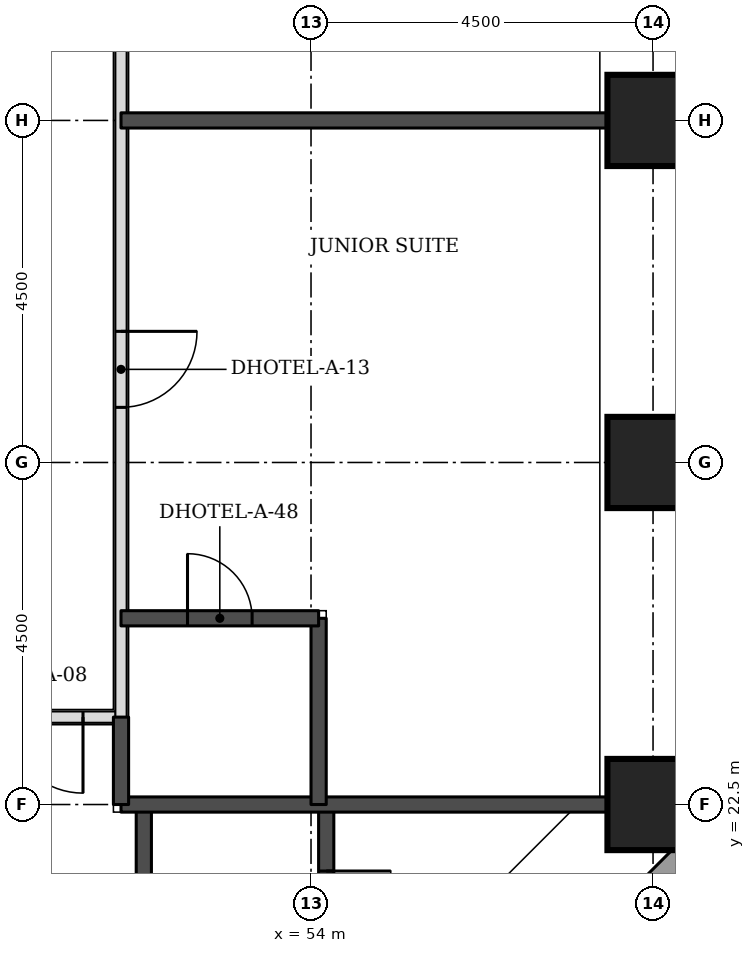
"""IFC4 building model, lengths in metres.
Left out: names, types, materials, properties, quantities, classifications, styles, units other than length and angle.
Written with IfcOpenShell. Run it as: python <this file> out.ifc"""

import sys

from ifc_helpers import new_model, si_unit, direction, frame, frame_2d, origin, origin_2d, place, context, subcontext, project, spatial, rectangle, extrude, element, fill, save


model = new_model("IFC4")
c1 = context("Model", 3, precision=1e-05, world=origin(), true_north=direction((0.0, 1.0)))
c2 = subcontext(c1, "Body", "Model", "MODEL_VIEW")
j1 = project(units=[si_unit("LENGTHUNIT", "METRE"), si_unit("PLANEANGLEUNIT", "RADIAN")], contexts=[c1])
p1 = place(None, origin())
s1 = spatial("IfcSite", under=j1, at=p1, CompositionType="ELEMENT")
p2 = place(p1, origin())
s2 = spatial("IfcBuilding", under=s1, at=p2, CompositionType="ELEMENT")
p3 = place(p2, frame((0.0, 0.0, 26.4)))
s3 = spatial("IfcBuildingStorey", under=s2, at=p3, CompositionType="ELEMENT", Elevation=26.4)
for number, where, z_axis, x_axis in (
    (1, (58.5, 22.5, 0.0), (0.0, 0.0, 1.0), (1.0, 0.0, 0.0)),
    (2, (58.5, 27.0, 0.0), (0.0, 0.0, 1.0), (1.0, 0.0, 0.0)),
    (3, (58.5, 31.5, 0.0), (0.0, 0.0, 1.0), (1.0, 0.0, 0.0)),
):
    element("IfcColumn", number, at=place(p3, frame(where, z_axis=z_axis, x_axis=x_axis)), inside=s3, PredefinedType="COLUMN", context=c2, shape_type="SweptSolid", body=[
        extrude(rectangle(XDim=1.2, YDim=1.2, at=origin_2d()), origin(), (0.0, 0.0, 1.0), 3.3),
    ])
p4 = place(p3, frame((54.27, 17.174, 0.0), z_axis=(0.0, 0.0, 1.0), x_axis=(0.707106781187, 0.707106781187, 0.0)))
e4 = element("IfcWall", 4, at=p4, inside=s3, PredefinedType="STANDARD", context=c2, shape_type="SweptSolid", body=[
    extrude(rectangle(XDim=7.151, YDim=0.35, at=frame_2d((3.576, 0.0))), origin(), (0.0, 0.0, 1.0), 3.055),
])
p5 = place(p4, frame((1.926, 0.0, 0.8)))
e5 = element("IfcOpeningElement", 5, at=p5, cuts=e4, PredefinedType="OPENING", context=c2, shape_type="SweptSolid", body=[
    extrude(rectangle(XDim=3.3, YDim=1.5, at=frame_2d((1.65, 0.75))), frame((0.0, 0.185, 0.0), z_axis=(0.0, -1.0, 0.0), x_axis=(1.0, 0.0, 0.0)), (0.0, 0.0, 1.0), 0.37),
])
p6 = place(p3, frame((19.15, 23.65, 0.0), z_axis=(0.0, 0.0, 1.0), x_axis=(1.0, 0.0, 0.0)))
e6 = element("IfcWall", 6, at=p6, inside=s3, PredefinedType="PARTITIONING", context=c2, shape_type="SweptSolid", body=[
    extrude(rectangle(XDim=32.35, YDim=0.15, at=frame_2d((16.175, 0.0))), origin(), (0.0, 0.0, 1.0), 3.08),
])
p7 = place(p6, frame((6.275, 0.0, 0.0)))
e7 = element("IfcOpeningElement", 7, at=p7, cuts=e6, PredefinedType="OPENING", context=c2, shape_type="SweptSolid", body=[
    extrude(rectangle(XDim=1.0, YDim=2.1, at=frame_2d((0.5, 1.05))), frame((0.0, 0.085, 0.0), z_axis=(0.0, -1.0, 0.0), x_axis=(1.0, 0.0, 0.0)), (0.0, 0.0, 1.0), 0.17),
])
p8 = place(p6, frame((8.675, 0.0, 0.0)))
e8 = element("IfcOpeningElement", 8, at=p8, cuts=e6, PredefinedType="OPENING", context=c2, shape_type="SweptSolid", body=[
    extrude(rectangle(XDim=1.0, YDim=2.1, at=frame_2d((0.5, 1.05))), frame((0.0, 0.085, 0.0), z_axis=(0.0, -1.0, 0.0), x_axis=(1.0, 0.0, 0.0)), (0.0, 0.0, 1.0), 0.17),
])
p9 = place(p6, frame((15.25, 0.0, 0.0)))
e9 = element("IfcOpeningElement", 9, at=p9, cuts=e6, PredefinedType="OPENING", context=c2, shape_type="SweptSolid", body=[
    extrude(rectangle(XDim=1.0, YDim=2.1, at=frame_2d((0.5, 1.05))), frame((0.0, 0.085, 0.0), z_axis=(0.0, -1.0, 0.0), x_axis=(1.0, 0.0, 0.0)), (0.0, 0.0, 1.0), 0.17),
])
p10 = place(p6, frame((17.675, 0.0, 0.0)))
e10 = element("IfcOpeningElement", 10, at=p10, cuts=e6, PredefinedType="OPENING", context=c2, shape_type="SweptSolid", body=[
    extrude(rectangle(XDim=1.0, YDim=2.1, at=frame_2d((0.5, 1.05))), frame((0.0, 0.085, 0.0), z_axis=(0.0, -1.0, 0.0), x_axis=(1.0, 0.0, 0.0)), (0.0, 0.0, 1.0), 0.17),
])
p11 = place(p6, frame((24.275, 0.0, 0.0)))
e11 = element("IfcOpeningElement", 11, at=p11, cuts=e6, PredefinedType="OPENING", context=c2, shape_type="SweptSolid", body=[
    extrude(rectangle(XDim=1.0, YDim=2.1, at=frame_2d((0.5, 1.05))), frame((0.0, 0.085, 0.0), z_axis=(0.0, -1.0, 0.0), x_axis=(1.0, 0.0, 0.0)), (0.0, 0.0, 1.0), 0.17),
])
p12 = place(p6, frame((26.675, 0.0, 0.0)))
e12 = element("IfcOpeningElement", 12, at=p12, cuts=e6, PredefinedType="OPENING", context=c2, shape_type="SweptSolid", body=[
    extrude(rectangle(XDim=1.0, YDim=2.1, at=frame_2d((0.5, 1.05))), frame((0.0, 0.085, 0.0), z_axis=(0.0, -1.0, 0.0), x_axis=(1.0, 0.0, 0.0)), (0.0, 0.0, 1.0), 0.17),
])
p13 = place(p6, frame((1.175, 0.0, 0.0)))
e13 = element("IfcOpeningElement", 13, at=p13, cuts=e6, PredefinedType="OPENING", context=c2, shape_type="SweptSolid", body=[
    extrude(rectangle(XDim=1.0, YDim=2.1, at=frame_2d((0.5, 1.05))), frame((0.0, 0.085, 0.0), z_axis=(0.0, -1.0, 0.0), x_axis=(1.0, 0.0, 0.0)), (0.0, 0.0, 1.0), 0.17),
])
p14 = place(p6, frame((30.85, 0.0, 0.0)))
e14 = element("IfcOpeningElement", 14, at=p14, cuts=e6, PredefinedType="OPENING", context=c2, shape_type="SweptSolid", body=[
    extrude(rectangle(XDim=1.0, YDim=2.1, at=frame_2d((0.5, 1.05))), frame((0.0, 0.085, 0.0), z_axis=(0.0, -1.0, 0.0), x_axis=(1.0, 0.0, 0.0)), (0.0, 0.0, 1.0), 0.17),
])
p15 = place(p3, frame((51.5, 23.65, 0.0), z_axis=(0.0, 0.0, 1.0), x_axis=(0.0, 1.0, 0.0)))
e15 = element("IfcWall", 15, at=p15, inside=s3, PredefinedType="PARTITIONING", context=c2, shape_type="SweptSolid", body=[
    extrude(rectangle(XDim=23.85, YDim=0.15, at=frame_2d((11.925, 0.0))), origin(), (0.0, 0.0, 1.0), 3.08),
])
p16 = place(p15, frame((4.075, 0.0, 0.0)))
e16 = element("IfcOpeningElement", 16, at=p16, cuts=e15, PredefinedType="OPENING", context=c2, shape_type="SweptSolid", body=[
    extrude(rectangle(XDim=1.0, YDim=2.1, at=frame_2d((0.5, 1.05))), frame((0.0, 0.085, 0.0), z_axis=(0.0, -1.0, 0.0), x_axis=(1.0, 0.0, 0.0)), (0.0, 0.0, 1.0), 0.17),
])
p17 = place(p15, frame((10.375, 0.0, 0.0)))
e17 = element("IfcOpeningElement", 17, at=p17, cuts=e15, PredefinedType="OPENING", context=c2, shape_type="SweptSolid", body=[
    extrude(rectangle(XDim=1.0, YDim=2.1, at=frame_2d((0.5, 1.05))), frame((0.0, 0.085, 0.0), z_axis=(0.0, -1.0, 0.0), x_axis=(1.0, 0.0, 0.0)), (0.0, 0.0, 1.0), 0.17),
])
p18 = place(p15, frame((19.9, 0.0, 0.0)))
e18 = element("IfcOpeningElement", 18, at=p18, cuts=e15, PredefinedType="OPENING", context=c2, shape_type="SweptSolid", body=[
    extrude(rectangle(XDim=0.9, YDim=2.1, at=frame_2d((0.45, 1.05))), frame((0.0, 0.085, 0.0), z_axis=(0.0, -1.0, 0.0), x_axis=(1.0, 0.0, 0.0)), (0.0, 0.0, 1.0), 0.17),
])
p19 = place(p3, frame((51.8, 20.0, 0.0), z_axis=(0.0, 0.0, 1.0), x_axis=(0.0, 1.0, 0.0)))
e19 = element("IfcWall", 19, at=p19, inside=s3, PredefinedType="SOLIDWALL", context=c2, shape_type="SweptSolid", body=[
    extrude(rectangle(XDim=2.5, YDim=0.2, at=frame_2d((1.25, 0.0))), origin(), (0.0, 0.0, 1.0), 3.08),
])
p20 = place(p3, frame((54.2, 20.0, 0.0), z_axis=(0.0, 0.0, 1.0), x_axis=(0.0, 1.0, 0.0)))
e20 = element("IfcWall", 20, at=p20, inside=s3, PredefinedType="SOLIDWALL", context=c2, shape_type="SweptSolid", body=[
    extrude(rectangle(XDim=2.5, YDim=0.2, at=frame_2d((1.25, 0.0))), origin(), (0.0, 0.0, 1.0), 3.08),
])
p21 = place(p20, frame((0.775, 0.0, 0.0)))
e21 = element("IfcOpeningElement", 21, at=p21, cuts=e20, PredefinedType="OPENING", context=c2, shape_type="SweptSolid", body=[
    extrude(rectangle(XDim=0.85, YDim=2.1, at=frame_2d((0.425, 1.05))), frame((0.0, 0.11, 0.0), z_axis=(0.0, -1.0, 0.0), x_axis=(1.0, 0.0, 0.0)), (0.0, 0.0, 1.0), 0.22),
])
p22 = place(p3, frame((51.5, 22.5, 0.0), z_axis=(0.0, 0.0, 1.0), x_axis=(1.0, 0.0, 0.0)))
e22 = element("IfcWall", 22, at=p22, inside=s3, PredefinedType="SOLIDWALL", context=c2, shape_type="SweptSolid", body=[
    extrude(rectangle(XDim=6.4, YDim=0.2, at=frame_2d((3.2, 0.0))), origin(), (0.0, 0.0, 1.0), 3.08),
])
p23 = place(p3, frame((51.5, 22.5, 0.0), z_axis=(0.0, 0.0, 1.0), x_axis=(0.0, 1.0, 0.0)))
e23 = element("IfcWall", 23, at=p23, inside=s3, PredefinedType="SOLIDWALL", context=c2, shape_type="SweptSolid", body=[
    extrude(rectangle(XDim=1.15, YDim=0.2, at=frame_2d((0.575, 0.0))), origin(), (0.0, 0.0, 1.0), 3.08),
])
p24 = place(p3, frame((54.1, 22.5, 0.0), z_axis=(0.0, 0.0, 1.0), x_axis=(0.0, 1.0, 0.0)))
e24 = element("IfcWall", 24, at=p24, inside=s3, PredefinedType="SOLIDWALL", context=c2, shape_type="SweptSolid", body=[
    extrude(rectangle(XDim=2.45, YDim=0.2, at=frame_2d((1.225, 0.0))), origin(), (0.0, 0.0, 1.0), 3.08),
])
p25 = place(p3, frame((51.5, 24.95, 0.0), z_axis=(0.0, 0.0, 1.0), x_axis=(1.0, 0.0, 0.0)))
e25 = element("IfcWall", 25, at=p25, inside=s3, PredefinedType="SOLIDWALL", context=c2, shape_type="SweptSolid", body=[
    extrude(rectangle(XDim=2.6, YDim=0.2, at=frame_2d((1.3, 0.0))), origin(), (0.0, 0.0, 1.0), 3.08),
])
p26 = place(p25, frame((0.875, 0.0, 0.0)))
e26 = element("IfcOpeningElement", 26, at=p26, cuts=e25, PredefinedType="OPENING", context=c2, shape_type="SweptSolid", body=[
    extrude(rectangle(XDim=0.85, YDim=2.1, at=frame_2d((0.425, 1.05))), frame((0.0, 0.11, 0.0), z_axis=(0.0, -1.0, 0.0), x_axis=(1.0, 0.0, 0.0)), (0.0, 0.0, 1.0), 0.22),
])
p27 = place(p3, frame((51.5, 31.5, 0.0), z_axis=(0.0, 0.0, 1.0), x_axis=(1.0, 0.0, 0.0)))
e27 = element("IfcWall", 27, at=p27, inside=s3, PredefinedType="SOLIDWALL", context=c2, shape_type="SweptSolid", body=[
    extrude(rectangle(XDim=6.4, YDim=0.2, at=frame_2d((3.2, 0.0))), origin(), (0.0, 0.0, 1.0), 3.08),
])
p28 = place(p16, frame((1.0, 0.0, 0.0), z_axis=(0.0, 0.0, 1.0), x_axis=(-1.0, 0.0, 0.0)))
e28 = element("IfcDoor", 28, at=p28, inside=s3, OperationType="SINGLE_SWING_LEFT", PredefinedType="DOOR", context=c2, shape_type="SweptSolid", body=[
    extrude(rectangle(XDim=1.0, YDim=2.1, at=frame_2d((0.5, 1.05))), frame((0.0, 0.025, 0.0), z_axis=(0.0, -1.0, 0.0), x_axis=(1.0, 0.0, 0.0)), (0.0, 0.0, 1.0), 0.05),
])
fill(e16, e28)
p29 = place(p26, origin())
e29 = element("IfcDoor", 29, at=p29, inside=s3, OperationType="SINGLE_SWING_LEFT", PredefinedType="DOOR", context=c2, shape_type="SweptSolid", body=[
    extrude(rectangle(XDim=0.85, YDim=2.1, at=frame_2d((0.425, 1.05))), frame((0.0, 0.025, 0.0), z_axis=(0.0, -1.0, 0.0), x_axis=(1.0, 0.0, 0.0)), (0.0, 0.0, 1.0), 0.05),
])
fill(e26, e29)
p30 = place(p14, frame((1.0, 0.0, 0.0), z_axis=(0.0, 0.0, 1.0), x_axis=(-1.0, 0.0, 0.0)))
e30 = element("IfcDoor", 30, at=p30, inside=s3, OperationType="SINGLE_SWING_LEFT", PredefinedType="DOOR", context=c2, shape_type="SweptSolid", body=[
    extrude(rectangle(XDim=1.0, YDim=2.1, at=frame_2d((0.5, 1.05))), frame((0.0, 0.025, 0.0), z_axis=(0.0, -1.0, 0.0), x_axis=(1.0, 0.0, 0.0)), (0.0, 0.0, 1.0), 0.05),
])
fill(e14, e30)
p31 = place(p21, frame((0.85, 0.0, 0.0), z_axis=(0.0, 0.0, 1.0), x_axis=(-1.0, 0.0, 0.0)))
e31 = element("IfcDoor", 31, at=p31, inside=s3, OperationType="SINGLE_SWING_LEFT", PredefinedType="DOOR", context=c2, shape_type="SweptSolid", body=[
    extrude(rectangle(XDim=0.85, YDim=2.1, at=frame_2d((0.425, 1.05))), frame((0.0, 0.025, 0.0), z_axis=(0.0, -1.0, 0.0), x_axis=(1.0, 0.0, 0.0)), (0.0, 0.0, 1.0), 0.05),
])
fill(e21, e31)
save(model, sys.argv[1])
